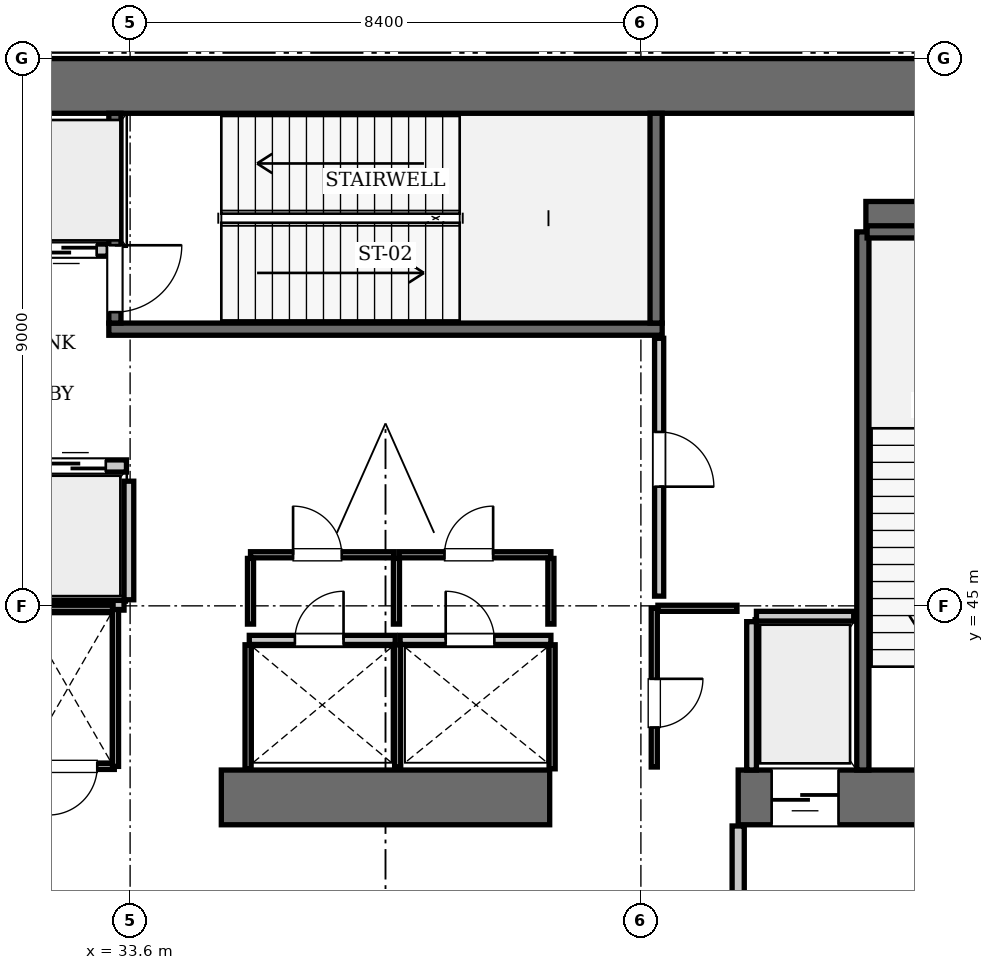
"""IFC4 building model, lengths in metres.
Left out: names, types, materials, properties, quantities, classifications, styles, units other than length and angle.
Written with IfcOpenShell. Run it as: python <this file> out.ifc"""

import sys

from ifc_helpers import new_model, si_unit, direction, frame, frame_2d, origin, place, context, subcontext, project, spatial, rectangle, extrude, element, fill, save


model = new_model("IFC4")
c1 = context("Model", 3, precision=1e-05, world=origin(), true_north=direction((0.0, 1.0)))
c2 = subcontext(c1, "Body", "Model", "MODEL_VIEW")
j1 = project(units=[si_unit("LENGTHUNIT", "METRE"), si_unit("PLANEANGLEUNIT", "RADIAN")], contexts=[c1])
p1 = place(None, origin())
s1 = spatial("IfcSite", under=j1, at=p1, CompositionType="ELEMENT")
p2 = place(p1, origin())
s2 = spatial("IfcBuilding", under=s1, at=p2, CompositionType="ELEMENT")
p3 = place(p2, frame((0.0, 0.0, -5.25)))
s3 = spatial("IfcBuildingStorey", under=s2, at=p3, CompositionType="ELEMENT", Elevation=-5.25)
p4 = place(p3, frame((25.2, 53.55, 0.0), z_axis=(0.0, 0.0, 1.0), x_axis=(1.0, 0.0, 0.0)))
e1 = element("IfcWall", 1, at=p4, inside=s3, PredefinedType="SHEAR", context=c2, shape_type="SweptSolid", body=[
    extrude(rectangle(XDim=25.2, YDim=0.9, at=frame_2d((12.6, 0.0))), origin(), (0.0, 0.0, 1.0), 5.25),
])
p5 = place(p3, frame((35.1, 41.85, 0.0), z_axis=(0.0, 0.0, 1.0), x_axis=(1.0, 0.0, 0.0)))
e2 = element("IfcWall", 2, at=p5, inside=s3, PredefinedType="SHEAR", context=c2, shape_type="SweptSolid", body=[
    extrude(rectangle(XDim=5.4, YDim=0.9, at=frame_2d((2.7, 0.0))), origin(), (0.0, 0.0, 1.0), 5.25),
])
p6 = place(p3, frame((43.6, 41.85, 0.0), z_axis=(0.0, 0.0, 1.0), x_axis=(1.0, 0.0, 0.0)))
e3 = element("IfcWall", 3, at=p6, inside=s3, PredefinedType="SHEAR", context=c2, shape_type="SweptSolid", body=[
    extrude(rectangle(XDim=6.8, YDim=0.9, at=frame_2d((3.4, 0.0))), origin(), (0.0, 0.0, 1.0), 5.25),
])
p7 = place(p6, frame((3.9, 0.0, 0.0)))
e4 = element("IfcOpeningElement", 4, at=p7, cuts=e3, PredefinedType="OPENING", context=c2, shape_type="SweptSolid", body=[
    extrude(rectangle(XDim=1.15, YDim=2.15, at=frame_2d((0.575, 1.075))), frame((0.0, 0.46, 0.0), z_axis=(0.0, -1.0, 0.0), x_axis=(1.0, 0.0, 0.0)), (0.0, 0.0, 1.0), 0.92),
])
p8 = place(p6, frame((0.55, 0.0, 0.0)))
e5 = element("IfcOpeningElement", 5, at=p8, cuts=e3, PredefinedType="OPENING", context=c2, shape_type="SweptSolid", body=[
    extrude(rectangle(XDim=1.1, YDim=2.2, at=frame_2d((0.55, 1.1))), frame((0.0, 0.46, 0.0), z_axis=(0.0, -1.0, 0.0), x_axis=(1.0, 0.0, 0.0)), (0.0, 0.0, 1.0), 0.92),
])
p9 = place(p3, frame((45.7, 51.4, 0.0), z_axis=(0.0, 0.0, 1.0), x_axis=(1.0, 0.0, 0.0)))
e6 = element("IfcWall", 6, at=p9, inside=s3, PredefinedType="SHEAR", context=c2, shape_type="SweptSolid", body=[
    extrude(rectangle(XDim=3.8, YDim=0.5, at=frame_2d((1.9, 0.0))), origin(), (0.0, 0.0, 1.0), 5.25),
])
p10 = place(p3, frame((33.25, 49.55, 0.0), z_axis=(0.0, 0.0, 1.0), x_axis=(1.0, 0.0, 0.0)))
e7 = element("IfcWall", 7, at=p10, inside=s3, PredefinedType="SOLIDWALL", context=c2, shape_type="SweptSolid", body=[
    extrude(rectangle(XDim=9.1, YDim=0.2, at=frame_2d((4.55, 0.0))), origin(), (0.0, 0.0, 1.0), 4.97),
])
p11 = place(p3, frame((42.25, 49.65, 0.0), z_axis=(0.0, 0.0, 1.0), x_axis=(0.0, 1.0, 0.0)))
e8 = element("IfcWall", 8, at=p11, inside=s3, PredefinedType="SOLIDWALL", context=c2, shape_type="SweptSolid", body=[
    extrude(rectangle(XDim=3.45, YDim=0.2, at=frame_2d((1.725, 0.0))), origin(), (0.0, 0.0, 1.0), 4.97),
])
p12 = place(p3, frame((33.35, 49.65, 0.0), z_axis=(0.0, 0.0, 1.0), x_axis=(0.0, 1.0, 0.0)))
e9 = element("IfcWall", 9, at=p12, inside=s3, PredefinedType="SOLIDWALL", context=c2, shape_type="SweptSolid", body=[
    extrude(rectangle(XDim=3.45, YDim=0.2, at=frame_2d((1.725, 0.0))), origin(), (0.0, 0.0, 1.0), 4.97),
])
p13 = place(p12, frame((0.18, 0.0, 0.0)))
e10 = element("IfcOpeningElement", 10, at=p13, cuts=e9, PredefinedType="OPENING", context=c2, shape_type="SweptSolid", body=[
    extrude(rectangle(XDim=1.1, YDim=2.15, at=frame_2d((0.55, 1.075))), frame((0.0, 0.11, 0.0), z_axis=(0.0, -1.0, 0.0), x_axis=(1.0, 0.0, 0.0)), (0.0, 0.0, 1.0), 0.22),
])
p14 = place(p3, frame((45.65, 42.3, 0.0), z_axis=(0.0, 0.0, 1.0), x_axis=(0.0, 1.0, 0.0)))
e11 = element("IfcWall", 11, at=p14, inside=s3, PredefinedType="SOLIDWALL", context=c2, shape_type="SweptSolid", body=[
    extrude(rectangle(XDim=8.85, YDim=0.2, at=frame_2d((4.425, 0.0))), origin(), (0.0, 0.0, 1.0), 4.97),
])
p15 = place(p3, frame((45.72, 51.15, 0.0), z_axis=(0.0, 0.0, 1.0), x_axis=(1.0, 0.0, 0.0)))
e12 = element("IfcWall", 12, at=p15, inside=s3, PredefinedType="SOLIDWALL", context=c2, shape_type="SweptSolid", body=[
    extrude(rectangle(XDim=3.5, YDim=0.2, at=frame_2d((1.75, 0.0))), origin(), (0.0, 0.0, 1.0), 4.97),
])
p16 = place(p3, frame((31.86, 47.3, 0.0), z_axis=(0.0, 0.0, 1.0), x_axis=(1.0, 0.0, 0.0)))
e13 = element("IfcWall", 13, at=p16, inside=s3, PredefinedType="SOLIDWALL", context=c2, shape_type="SweptSolid", body=[
    extrude(rectangle(XDim=1.68, YDim=0.2, at=frame_2d((0.84, 0.0))), origin(), (0.0, 0.0, 1.0), 4.97),
])
p17 = place(p16, frame((0.34, 0.0, 0.0)))
e14 = element("IfcOpeningElement", 14, at=p17, cuts=e13, PredefinedType="OPENING", context=c2, shape_type="SweptSolid", body=[
    extrude(rectangle(XDim=1.0, YDim=2.15, at=frame_2d((0.5, 1.075))), frame((0.0, 0.11, 0.0), z_axis=(0.0, -1.0, 0.0), x_axis=(1.0, 0.0, 0.0)), (0.0, 0.0, 1.0), 0.22),
])
p18 = place(p3, frame((31.86, 50.85, 0.0), z_axis=(0.0, 0.0, 1.0), x_axis=(1.0, 0.0, 0.0)))
e15 = element("IfcWall", 15, at=p18, inside=s3, PredefinedType="SOLIDWALL", context=c2, shape_type="SweptSolid", body=[
    extrude(rectangle(XDim=1.38, YDim=0.2, at=frame_2d((0.69, 0.0))), origin(), (0.0, 0.0, 1.0), 4.97),
])
p19 = place(p18, frame((0.19, 0.0, 0.0)))
e16 = element("IfcOpeningElement", 16, at=p19, cuts=e15, PredefinedType="OPENING", context=c2, shape_type="SweptSolid", body=[
    extrude(rectangle(XDim=1.0, YDim=2.15, at=frame_2d((0.5, 1.075))), frame((0.0, 0.11, 0.0), z_axis=(0.0, -1.0, 0.0), x_axis=(1.0, 0.0, 0.0)), (0.0, 0.0, 1.0), 0.22),
])
p20 = place(p3, frame((43.9, 44.83, 0.0), z_axis=(0.0, 0.0, 1.0), x_axis=(1.0, 0.0, 0.0)))
e17 = element("IfcWall", 17, at=p20, inside=s3, PredefinedType="SOLIDWALL", context=c2, shape_type="SweptSolid", body=[
    extrude(rectangle(XDim=1.6, YDim=0.16, at=frame_2d((0.8, 0.0))), origin(), (0.0, 0.0, 1.0), 4.97),
])
p21 = place(p3, frame((43.82, 42.3, 0.0), z_axis=(0.0, 0.0, 1.0), x_axis=(0.0, 1.0, 0.0)))
e18 = element("IfcWall", 18, at=p21, inside=s3, PredefinedType="SOLIDWALL", context=c2, shape_type="SweptSolid", body=[
    extrude(rectangle(XDim=2.44, YDim=0.16, at=frame_2d((1.22, 0.0))), origin(), (0.0, 0.0, 1.0), 4.97),
])
p22 = place(p3, frame((33.58, 45.1, 0.0), z_axis=(0.0, 0.0, 1.0), x_axis=(0.0, 1.0, 0.0)))
e19 = element("IfcWall", 19, at=p22, inside=s3, PredefinedType="SOLIDWALL", context=c2, shape_type="SweptSolid", body=[
    extrude(rectangle(XDim=1.95, YDim=0.16, at=frame_2d((0.975, 0.0))), origin(), (0.0, 0.0, 1.0), 4.97),
])
p23 = place(p3, frame((30.05, 45.01, 0.0), z_axis=(0.0, 0.0, 1.0), x_axis=(1.0, 0.0, 0.0)))
e20 = element("IfcWall", 20, at=p23, inside=s3, PredefinedType="SOLIDWALL", context=c2, shape_type="SweptSolid", body=[
    extrude(rectangle(XDim=3.45, YDim=0.16, at=frame_2d((1.725, 0.0))), origin(), (0.0, 0.0, 1.0), 4.97),
])
p24 = place(p3, frame((43.6, 38.31, 0.0), z_axis=(0.0, 0.0, 1.0), x_axis=(0.0, 1.0, 0.0)))
e21 = element("IfcWall", 21, at=p24, inside=s3, PredefinedType="PARTITIONING", context=c2, shape_type="SweptSolid", body=[
    extrude(rectangle(XDim=3.07, YDim=0.2, at=frame_2d((1.535, 0.0))), origin(), (0.0, 0.0, 1.0), 4.97),
])
p25 = place(p3, frame((32.02, 42.36, 0.0), z_axis=(0.0, 0.0, 1.0), x_axis=(1.0, 0.0, 0.0)))
e22 = element("IfcWall", 22, at=p25, inside=s3, PredefinedType="PARTITIONING", context=c2, shape_type="SweptSolid", body=[
    extrude(rectangle(XDim=1.32, YDim=0.1, at=frame_2d((0.66, 0.0))), origin(), (0.0, 0.0, 1.0), 4.97),
])
p26 = place(p25, frame((0.24, 0.0, 0.0)))
e23 = element("IfcOpeningElement", 23, at=p26, cuts=e22, PredefinedType="OPENING", context=c2, shape_type="SweptSolid", body=[
    extrude(rectangle(XDim=0.8, YDim=2.05, at=frame_2d((0.4, 1.025))), frame((0.0, 0.06, 0.0), z_axis=(0.0, -1.0, 0.0), x_axis=(1.0, 0.0, 0.0)), (0.0, 0.0, 1.0), 0.12),
])
p27 = place(p3, frame((31.84, 44.96, 0.0), z_axis=(0.0, 0.0, 1.0), x_axis=(1.0, 0.0, 0.0)))
e24 = element("IfcWall", 24, at=p27, inside=s3, PredefinedType="PARTITIONING", context=c2, shape_type="SweptSolid", body=[
    extrude(rectangle(XDim=1.48, YDim=0.1, at=frame_2d((0.74, 0.0))), origin(), (0.0, 0.0, 1.0), 4.97),
])
p28 = place(p3, frame((33.36, 42.36, 0.0), z_axis=(0.0, 0.0, 1.0), x_axis=(0.0, 1.0, 0.0)))
e25 = element("IfcWall", 25, at=p28, inside=s3, PredefinedType="PARTITIONING", context=c2, shape_type="SweptSolid", body=[
    extrude(rectangle(XDim=2.58, YDim=0.1, at=frame_2d((1.29, 0.0))), origin(), (0.0, 0.0, 1.0), 4.97),
])
p29 = place(p3, frame((35.58, 45.84, 0.0), z_axis=(0.0, 0.0, 1.0), x_axis=(1.0, 0.0, 0.0)))
e26 = element("IfcWall", 26, at=p29, inside=s3, PredefinedType="PARTITIONING", context=c2, shape_type="SweptSolid", body=[
    extrude(rectangle(XDim=2.36, YDim=0.1, at=frame_2d((1.18, 0.0))), origin(), (0.0, 0.0, 1.0), 4.97),
])
p30 = place(p29, frame((0.7, 0.0, 0.0)))
e27 = element("IfcOpeningElement", 27, at=p30, cuts=e26, PredefinedType="OPENING", context=c2, shape_type="SweptSolid", body=[
    extrude(rectangle(XDim=0.8, YDim=2.05, at=frame_2d((0.4, 1.025))), frame((0.0, 0.06, 0.0), z_axis=(0.0, -1.0, 0.0), x_axis=(1.0, 0.0, 0.0)), (0.0, 0.0, 1.0), 0.12),
])
p31 = place(p3, frame((38.02, 45.84, 0.0), z_axis=(0.0, 0.0, 1.0), x_axis=(1.0, 0.0, 0.0)))
e28 = element("IfcWall", 28, at=p31, inside=s3, PredefinedType="PARTITIONING", context=c2, shape_type="SweptSolid", body=[
    extrude(rectangle(XDim=2.5, YDim=0.1, at=frame_2d((1.25, 0.0))), origin(), (0.0, 0.0, 1.0), 4.97),
])
p32 = place(p31, frame((0.75, 0.0, 0.0)))
e29 = element("IfcOpeningElement", 29, at=p32, cuts=e28, PredefinedType="OPENING", context=c2, shape_type="SweptSolid", body=[
    extrude(rectangle(XDim=0.8, YDim=2.05, at=frame_2d((0.4, 1.025))), frame((0.0, 0.06, 0.0), z_axis=(0.0, -1.0, 0.0), x_axis=(1.0, 0.0, 0.0)), (0.0, 0.0, 1.0), 0.12),
])
for number, where, z_axis, x_axis in (
    (30, (35.58, 44.7, 0.0), (0.0, 0.0, 1.0), (0.0, 1.0, 0.0)),
    (31, (37.98, 44.7, 0.0), (0.0, 0.0, 1.0), (0.0, 1.0, 0.0)),
    (32, (40.52, 44.7, 0.0), (0.0, 0.0, 1.0), (0.0, 1.0, 0.0)),
):
    element("IfcWall", number, at=place(p3, frame(where, z_axis=z_axis, x_axis=x_axis)), inside=s3, PredefinedType="PARTITIONING", context=c2, shape_type="SweptSolid", body=[
        extrude(rectangle(XDim=1.08, YDim=0.1, at=frame_2d((0.54, 0.0))), origin(), (0.0, 0.0, 1.0), 4.97),
    ])
p33 = place(p3, frame((42.22, 42.35, 0.0), z_axis=(0.0, 0.0, 1.0), x_axis=(0.0, 1.0, 0.0)))
e33 = element("IfcWall", 33, at=p33, inside=s3, PredefinedType="PARTITIONING", context=c2, shape_type="SweptSolid", body=[
    extrude(rectangle(XDim=2.61, YDim=0.1, at=frame_2d((1.305, 0.0))), origin(), (0.0, 0.0, 1.0), 4.97),
])
p34 = place(p33, frame((0.65, 0.0, 0.0)))
e34 = element("IfcOpeningElement", 34, at=p34, cuts=e33, PredefinedType="OPENING", context=c2, shape_type="SweptSolid", body=[
    extrude(rectangle(XDim=0.8, YDim=2.05, at=frame_2d((0.4, 1.025))), frame((0.0, 0.06, 0.0), z_axis=(0.0, -1.0, 0.0), x_axis=(1.0, 0.0, 0.0)), (0.0, 0.0, 1.0), 0.12),
])
p35 = place(p3, frame((42.28, 44.96, 0.0), z_axis=(0.0, 0.0, 1.0), x_axis=(1.0, 0.0, 0.0)))
e35 = element("IfcWall", 35, at=p35, inside=s3, PredefinedType="PARTITIONING", context=c2, shape_type="SweptSolid", body=[
    extrude(rectangle(XDim=1.3, YDim=0.1, at=frame_2d((0.65, 0.0))), origin(), (0.0, 0.0, 1.0), 4.97),
])
p36 = place(p3, frame((35.56, 44.44, 0.0), z_axis=(0.0, 0.0, 1.0), x_axis=(1.0, 0.0, 0.0)))
e36 = element("IfcWall", 36, at=p36, inside=s3, PredefinedType="PARTITIONING", context=c2, shape_type="SweptSolid", body=[
    extrude(rectangle(XDim=2.4, YDim=0.15, at=frame_2d((1.2, 0.0))), origin(), (0.0, 0.0, 1.0), 4.97),
])
p37 = place(p36, frame((0.75, 0.0, 0.0)))
e37 = element("IfcOpeningElement", 37, at=p37, cuts=e36, PredefinedType="OPENING", context=c2, shape_type="SweptSolid", body=[
    extrude(rectangle(XDim=0.8, YDim=2.05, at=frame_2d((0.4, 1.025))), frame((0.0, 0.085, 0.0), z_axis=(0.0, -1.0, 0.0), x_axis=(1.0, 0.0, 0.0)), (0.0, 0.0, 1.0), 0.17),
])
p38 = place(p3, frame((38.04, 44.44, 0.0), z_axis=(0.0, 0.0, 1.0), x_axis=(1.0, 0.0, 0.0)))
e38 = element("IfcWall", 38, at=p38, inside=s3, PredefinedType="PARTITIONING", context=c2, shape_type="SweptSolid", body=[
    extrude(rectangle(XDim=2.48, YDim=0.15, at=frame_2d((1.24, 0.0))), origin(), (0.0, 0.0, 1.0), 4.97),
])
p39 = place(p38, frame((0.75, 0.0, 0.0)))
e39 = element("IfcOpeningElement", 39, at=p39, cuts=e38, PredefinedType="OPENING", context=c2, shape_type="SweptSolid", body=[
    extrude(rectangle(XDim=0.8, YDim=2.05, at=frame_2d((0.4, 1.025))), frame((0.0, 0.085, 0.0), z_axis=(0.0, -1.0, 0.0), x_axis=(1.0, 0.0, 0.0)), (0.0, 0.0, 1.0), 0.17),
])
for number, where, z_axis, x_axis in (
    (40, (35.54, 42.32, 0.0), (0.0, 0.0, 1.0), (0.0, 1.0, 0.0)),
    (41, (40.54, 42.32, 0.0), (0.0, 0.0, 1.0), (0.0, 1.0, 0.0)),
):
    element("IfcWall", number, at=place(p3, frame(where, z_axis=z_axis, x_axis=x_axis)), inside=s3, PredefinedType="PARTITIONING", context=c2, shape_type="SweptSolid", body=[
        extrude(rectangle(XDim=2.04, YDim=0.1, at=frame_2d((1.02, 0.0))), origin(), (0.0, 0.0, 1.0), 4.97),
    ])
p40 = place(p3, frame((38.0, 42.35, 0.0), z_axis=(0.0, 0.0, 1.0), x_axis=(0.0, 1.0, 0.0)))
e42 = element("IfcWall", 42, at=p40, inside=s3, PredefinedType="PARTITIONING", context=c2, shape_type="SweptSolid", body=[
    extrude(rectangle(XDim=2.01, YDim=0.1, at=frame_2d((1.005, 0.0))), origin(), (0.0, 0.0, 1.0), 4.97),
])
p41 = place(p3, frame((42.3, 45.16, 0.0), z_axis=(0.0, 0.0, 1.0), x_axis=(0.0, 1.0, 0.0)))
e43 = element("IfcWall", 43, at=p41, inside=s3, PredefinedType="PARTITIONING", context=c2, shape_type="SweptSolid", body=[
    extrude(rectangle(XDim=4.24, YDim=0.15, at=frame_2d((2.12, 0.0))), origin(), (0.0, 0.0, 1.0), 4.97),
])
p42 = place(p41, frame((1.8, 0.0, 0.0)))
e44 = element("IfcOpeningElement", 44, at=p42, cuts=e43, PredefinedType="OPENING", context=c2, shape_type="SweptSolid", body=[
    extrude(rectangle(XDim=0.9, YDim=2.1, at=frame_2d((0.45, 1.05))), frame((0.0, 0.085, 0.0), z_axis=(0.0, -1.0, 0.0), x_axis=(1.0, 0.0, 0.0)), (0.0, 0.0, 1.0), 0.17),
])
p43 = place(p13, frame((1.1, 0.0, 0.0), z_axis=(0.0, 0.0, 1.0), x_axis=(-1.0, 0.0, 0.0)))
e45 = element("IfcDoor", 45, at=p43, inside=s3, OperationType="SINGLE_SWING_LEFT", PredefinedType="DOOR", context=c2, shape_type="SweptSolid", body=[
    extrude(rectangle(XDim=1.1, YDim=2.15, at=frame_2d((0.55, 1.075))), frame((0.0, 0.025, 0.0), z_axis=(0.0, -1.0, 0.0), x_axis=(1.0, 0.0, 0.0)), (0.0, 0.0, 1.0), 0.05),
])
fill(e10, e45)
p44 = place(p17, origin())
e46 = element("IfcDoor", 46, at=p44, inside=s3, OperationType="SLIDING_TO_LEFT", PredefinedType="DOOR", context=c2, shape_type="SweptSolid", body=[
    extrude(rectangle(XDim=1.0, YDim=2.15, at=frame_2d((0.5, 1.075))), frame((0.0, 0.025, 0.0), z_axis=(0.0, -1.0, 0.0), x_axis=(1.0, 0.0, 0.0)), (0.0, 0.0, 1.0), 0.05),
])
fill(e14, e46)
p45 = place(p19, frame((1.0, 0.0, 0.0), z_axis=(0.0, 0.0, 1.0), x_axis=(-1.0, 0.0, 0.0)))
e47 = element("IfcDoor", 47, at=p45, inside=s3, OperationType="SLIDING_TO_LEFT", PredefinedType="DOOR", context=c2, shape_type="SweptSolid", body=[
    extrude(rectangle(XDim=1.0, YDim=2.15, at=frame_2d((0.5, 1.075))), frame((0.0, 0.025, 0.0), z_axis=(0.0, -1.0, 0.0), x_axis=(1.0, 0.0, 0.0)), (0.0, 0.0, 1.0), 0.05),
])
fill(e16, e47)
p46 = place(p8, frame((1.1, 0.0, 0.0), z_axis=(0.0, 0.0, 1.0), x_axis=(-1.0, 0.0, 0.0)))
e48 = element("IfcDoor", 48, at=p46, inside=s3, OperationType="SLIDING_TO_LEFT", PredefinedType="DOOR", context=c2, shape_type="SweptSolid", body=[
    extrude(rectangle(XDim=1.1, YDim=2.2, at=frame_2d((0.55, 1.1))), frame((0.0, 0.025, 0.0), z_axis=(0.0, -1.0, 0.0), x_axis=(1.0, 0.0, 0.0)), (0.0, 0.0, 1.0), 0.05),
])
fill(e5, e48)
p47 = place(p26, frame((0.8, 0.0, 0.0), z_axis=(0.0, 0.0, 1.0), x_axis=(-1.0, 0.0, 0.0)))
e49 = element("IfcDoor", 49, at=p47, inside=s3, OperationType="SINGLE_SWING_RIGHT", PredefinedType="DOOR", context=c2, shape_type="SweptSolid", body=[
    extrude(rectangle(XDim=0.8, YDim=2.05, at=frame_2d((0.4, 1.025))), frame((0.0, 0.025, 0.0), z_axis=(0.0, -1.0, 0.0), x_axis=(1.0, 0.0, 0.0)), (0.0, 0.0, 1.0), 0.05),
])
fill(e23, e49)
p48 = place(p30, origin())
e50 = element("IfcDoor", 50, at=p48, inside=s3, OperationType="SINGLE_SWING_LEFT", PredefinedType="DOOR", context=c2, shape_type="SweptSolid", body=[
    extrude(rectangle(XDim=0.8, YDim=2.05, at=frame_2d((0.4, 1.025))), frame((0.0, 0.025, 0.0), z_axis=(0.0, -1.0, 0.0), x_axis=(1.0, 0.0, 0.0)), (0.0, 0.0, 1.0), 0.05),
])
fill(e27, e50)
p49 = place(p32, origin())
e51 = element("IfcDoor", 51, at=p49, inside=s3, OperationType="SINGLE_SWING_RIGHT", PredefinedType="DOOR", context=c2, shape_type="SweptSolid", body=[
    extrude(rectangle(XDim=0.8, YDim=2.05, at=frame_2d((0.4, 1.025))), frame((0.0, 0.025, 0.0), z_axis=(0.0, -1.0, 0.0), x_axis=(1.0, 0.0, 0.0)), (0.0, 0.0, 1.0), 0.05),
])
fill(e29, e51)
p50 = place(p34, frame((0.8, 0.0, 0.0), z_axis=(0.0, 0.0, 1.0), x_axis=(-1.0, 0.0, 0.0)))
e52 = element("IfcDoor", 52, at=p50, inside=s3, OperationType="SINGLE_SWING_LEFT", PredefinedType="DOOR", context=c2, shape_type="SweptSolid", body=[
    extrude(rectangle(XDim=0.8, YDim=2.05, at=frame_2d((0.4, 1.025))), frame((0.0, 0.025, 0.0), z_axis=(0.0, -1.0, 0.0), x_axis=(1.0, 0.0, 0.0)), (0.0, 0.0, 1.0), 0.05),
])
fill(e34, e52)
p51 = place(p37, origin())
e53 = element("IfcDoor", 53, at=p51, inside=s3, OperationType="SINGLE_SWING_RIGHT", PredefinedType="DOOR", context=c2, shape_type="SweptSolid", body=[
    extrude(rectangle(XDim=0.8, YDim=2.05, at=frame_2d((0.4, 1.025))), frame((0.0, 0.025, 0.0), z_axis=(0.0, -1.0, 0.0), x_axis=(1.0, 0.0, 0.0)), (0.0, 0.0, 1.0), 0.05),
])
fill(e37, e53)
p52 = place(p39, origin())
e54 = element("IfcDoor", 54, at=p52, inside=s3, OperationType="SINGLE_SWING_LEFT", PredefinedType="DOOR", context=c2, shape_type="SweptSolid", body=[
    extrude(rectangle(XDim=0.8, YDim=2.05, at=frame_2d((0.4, 1.025))), frame((0.0, 0.025, 0.0), z_axis=(0.0, -1.0, 0.0), x_axis=(1.0, 0.0, 0.0)), (0.0, 0.0, 1.0), 0.05),
])
fill(e39, e54)
p53 = place(p42, frame((0.9, 0.0, 0.0), z_axis=(0.0, 0.0, 1.0), x_axis=(-1.0, 0.0, 0.0)))
e55 = element("IfcDoor", 55, at=p53, inside=s3, OperationType="SINGLE_SWING_RIGHT", PredefinedType="DOOR", context=c2, shape_type="SweptSolid", body=[
    extrude(rectangle(XDim=0.9, YDim=2.1, at=frame_2d((0.45, 1.05))), frame((0.0, 0.025, 0.0), z_axis=(0.0, -1.0, 0.0), x_axis=(1.0, 0.0, 0.0)), (0.0, 0.0, 1.0), 0.05),
])
fill(e44, e55)
save(model, sys.argv[1])
